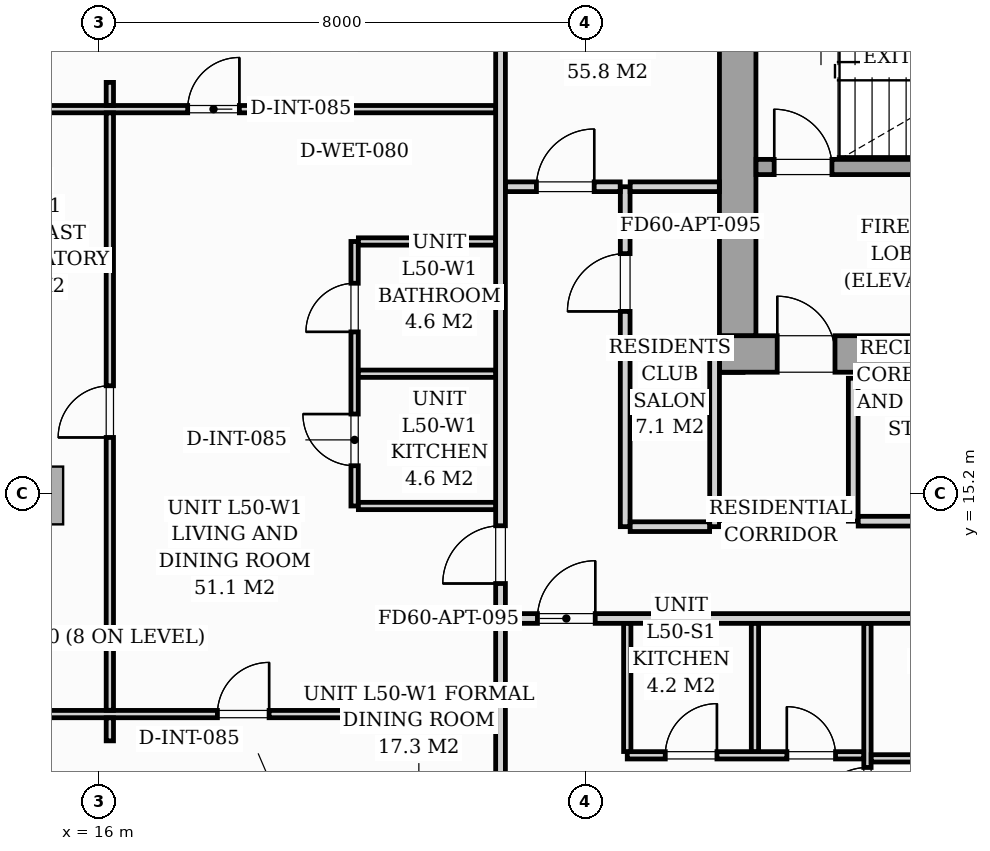
"""IFC4 building model, lengths in metres.
Left out: names, types, materials, properties, quantities, classifications, styles, units other than length and angle.
Written with IfcOpenShell. Run it as: python <this file> out.ifc"""

import sys

from ifc_helpers import new_model, si_unit, direction, frame, frame_2d, origin, origin_2d, place, context, subcontext, project, spatial, rectangle, i_section, extrude, source, transform, mapped, element, fill, save


model = new_model("IFC4")
c1 = context("Model", 3, precision=1e-05, world=origin(), true_north=direction((0.0, 1.0)))
c2 = subcontext(c1, "Body", "Model", "MODEL_VIEW")
j1 = project(units=[si_unit("LENGTHUNIT", "METRE"), si_unit("PLANEANGLEUNIT", "RADIAN")], contexts=[c1])
p1 = place(None, origin())
s1 = spatial("IfcSite", under=j1, at=p1, CompositionType="ELEMENT")
p2 = place(p1, origin())
s2 = spatial("IfcBuilding", under=s1, at=p2, CompositionType="ELEMENT")
p3 = place(p2, frame((0.0, 0.0, 176.2)))
s3 = spatial("IfcBuildingStorey", under=s2, at=p3, CompositionType="ELEMENT", Elevation=176.2)
m1 = source(origin(), c2, "Body", "SweptSolid", [
    extrude(i_section(OverallWidth=0.416, OverallDepth=0.446, WebThickness=0.039, FlangeThickness=0.063, FilletRadius=0.018, at=origin_2d()), origin(), (0.0, 0.0, 1.0), 3.196),
])
p4 = place(p3, frame((26.4, 17.4, 0.002), z_axis=(0.0, 0.0, 1.0), x_axis=(1.0, 0.0, 0.0)))
e1 = element("IfcColumn", 1, at=p4, inside=s3, PredefinedType="PILASTER", context=c2, shape_type="MappedRepresentation", body=[
    mapped(m1, transform((0.0, 0.0, 0.0), scale=1.0)),
])
m2 = source(origin(), c2, "Body", "SweptSolid", [
    extrude(rectangle(XDim=0.75, YDim=0.95, at=origin_2d()), origin(), (0.0, 0.0, 1.0), 3.196),
])
p5 = place(p3, frame((15.032, 15.173, 0.002), z_axis=(0.0, 0.0, 1.0), x_axis=(0.995396198367, 0.09584575252, 0.0)))
e2 = element("IfcColumn", 2, at=p5, inside=s3, PredefinedType="COLUMN", context=c2, shape_type="MappedRepresentation", body=[
    mapped(m2, transform((0.0, 0.0, 0.0), scale=1.0)),
])
p6 = place(p3, frame((26.2, 17.5, 0.0), z_axis=(0.0, 0.0, 1.0), x_axis=(1.0, 0.0, 0.0)))
e3 = element("IfcWall", 3, at=p6, inside=s3, PredefinedType="SHEAR", context=c2, shape_type="SweptSolid", body=[
    extrude(rectangle(XDim=19.6, YDim=0.6, at=frame_2d((9.8, 0.0))), origin(), (0.0, 0.0, 1.0), 3.2),
])
p7 = place(p6, frame((0.95, 0.0, 0.0)))
e4 = element("IfcOpeningElement", 4, at=p7, cuts=e3, PredefinedType="OPENING", context=c2, shape_type="SweptSolid", body=[
    extrude(rectangle(XDim=0.95, YDim=2.06, at=frame_2d((0.475, 1.03))), frame((0.0, 0.31, 0.0), z_axis=(0.0, -1.0, 0.0), x_axis=(1.0, 0.0, 0.0)), (0.0, 0.0, 1.0), 0.62),
])
p8 = place(p6, frame((9.38, 0.0, 0.0)))
e5 = element("IfcOpeningElement", 5, at=p8, cuts=e3, PredefinedType="OPENING", context=c2, shape_type="SweptSolid", body=[
    extrude(rectangle(XDim=0.85, YDim=2.0, at=frame_2d((0.425, 1.0))), frame((0.0, 0.31, 0.0), z_axis=(0.0, -1.0, 0.0), x_axis=(1.0, 0.0, 0.0)), (0.0, 0.0, 1.0), 0.62),
])
p9 = place(p6, frame((17.55, 0.0, 0.0)))
e6 = element("IfcOpeningElement", 6, at=p9, cuts=e3, PredefinedType="OPENING", context=c2, shape_type="SweptSolid", body=[
    extrude(rectangle(XDim=0.95, YDim=2.06, at=frame_2d((0.475, 1.03))), frame((0.0, 0.31, 0.0), z_axis=(0.0, -1.0, 0.0), x_axis=(1.0, 0.0, 0.0)), (0.0, 0.0, 1.0), 0.62),
])
p10 = place(p3, frame((26.5, 17.802, 0.0), z_axis=(0.0, 0.0, 1.0), x_axis=(0.0, 1.0, 0.0)))
e7 = element("IfcWall", 7, at=p10, inside=s3, PredefinedType="SHEAR", context=c2, shape_type="SweptSolid", body=[
    extrude(rectangle(XDim=5.796, YDim=0.6, at=frame_2d((2.898, 0.0))), origin(), (0.0, 0.0, 1.0), 3.2),
])
p11 = place(p3, frame((26.802, 20.575, 0.0), z_axis=(0.0, 0.0, 1.0), x_axis=(1.0, 0.0, 0.0)))
e8 = element("IfcWall", 8, at=p11, inside=s3, PredefinedType="SOLIDWALL", context=c2, shape_type="SweptSolid", body=[
    extrude(rectangle(XDim=8.148, YDim=0.25, at=frame_2d((4.074, 0.0))), origin(), (0.0, 0.0, 1.0), 3.2),
])
p12 = place(p11, frame((0.298, 0.0, 0.0)))
e9 = element("IfcOpeningElement", 9, at=p12, cuts=e8, PredefinedType="OPENING", context=c2, shape_type="SweptSolid", body=[
    extrude(rectangle(XDim=0.95, YDim=2.06, at=frame_2d((0.475, 1.03))), frame((0.0, 0.135, 0.0), z_axis=(0.0, -1.0, 0.0), x_axis=(1.0, 0.0, 0.0)), (0.0, 0.0, 1.0), 0.27),
])
p13 = place(p3, frame((28.4, 14.75, 0.0), z_axis=(0.0, 0.0, 1.0), x_axis=(0.0, 1.0, 0.0)))
e10 = element("IfcWall", 10, at=p13, inside=s3, PredefinedType="PARTITIONING", context=c2, shape_type="SweptSolid", body=[
    extrude(rectangle(XDim=2.35, YDim=0.16, at=frame_2d((1.175, 0.0))), origin(), (0.0, 0.0, 1.0), 2.94),
])
p14 = place(p3, frame((28.482, 14.75, 0.0), z_axis=(0.0, 0.0, 1.0), x_axis=(1.0, 0.0, 0.0)))
e11 = element("IfcWall", 11, at=p14, inside=s3, PredefinedType="PARTITIONING", context=c2, shape_type="SweptSolid", body=[
    extrude(rectangle(XDim=4.516, YDim=0.16, at=frame_2d((2.258, 0.0))), origin(), (0.0, 0.0, 1.0), 2.94),
])
p15 = place(p14, frame((1.868, 0.0, 0.0)))
e12 = element("IfcOpeningElement", 12, at=p15, cuts=e11, PredefinedType="OPENING", context=c2, shape_type="SweptSolid", body=[
    extrude(rectangle(XDim=0.8, YDim=2.05, at=frame_2d((0.4, 1.025))), frame((0.0, 0.09, 0.0), z_axis=(0.0, -1.0, 0.0), x_axis=(1.0, 0.0, 0.0)), (0.0, 0.0, 1.0), 0.18),
])
p16 = place(p3, frame((22.6, 13.15, 0.0), z_axis=(0.0, 0.0, 1.0), x_axis=(1.0, 0.0, 0.0)))
e13 = element("IfcWall", 13, at=p16, inside=s3, PredefinedType="PARTITIONING", context=c2, shape_type="SweptSolid", body=[
    extrude(rectangle(XDim=23.28, YDim=0.16, at=frame_2d((11.64, 0.0))), origin(), (0.0, 0.0, 1.0), 2.94),
])
p17 = place(p16, frame((0.607, 0.0, 0.0)))
e14 = element("IfcOpeningElement", 14, at=p17, cuts=e13, PredefinedType="OPENING", context=c2, shape_type="SweptSolid", body=[
    extrude(rectangle(XDim=0.95, YDim=2.06, at=frame_2d((0.475, 1.03))), frame((0.0, 0.09, 0.0), z_axis=(0.0, -1.0, 0.0), x_axis=(1.0, 0.0, 0.0)), (0.0, 0.0, 1.0), 0.18),
])
p18 = place(p16, frame((11.717, 0.0, 0.0)))
e15 = element("IfcOpeningElement", 15, at=p18, cuts=e13, PredefinedType="OPENING", context=c2, shape_type="SweptSolid", body=[
    extrude(rectangle(XDim=0.95, YDim=2.06, at=frame_2d((0.475, 1.03))), frame((0.0, 0.09, 0.0), z_axis=(0.0, -1.0, 0.0), x_axis=(1.0, 0.0, 0.0)), (0.0, 0.0, 1.0), 0.18),
])
p19 = place(p3, frame((22.6, 6.922, 0.0), z_axis=(0.0, 0.0, 1.0), x_axis=(0.0, 1.0, 0.0)))
e16 = element("IfcWall", 16, at=p19, inside=s3, PredefinedType="PARTITIONING", context=c2, shape_type="SweptSolid", body=[
    extrude(rectangle(XDim=6.146, YDim=0.16, at=frame_2d((3.073, 0.0))), origin(), (0.0, 0.0, 1.0), 2.94),
])
p20 = place(p3, frame((22.6, 13.232, 0.0), z_axis=(0.0, 0.0, 1.0), x_axis=(0.0, 1.0, 0.0)))
e17 = element("IfcWall", 17, at=p20, inside=s3, PredefinedType="PARTITIONING", context=c2, shape_type="SweptSolid", body=[
    extrude(rectangle(XDim=11.649, YDim=0.16, at=frame_2d((5.824, 0.0))), origin(), (0.0, 0.0, 1.0), 2.94),
])
p21 = place(p20, frame((0.493, 0.0, 0.0)))
e18 = element("IfcOpeningElement", 18, at=p21, cuts=e17, PredefinedType="OPENING", context=c2, shape_type="SweptSolid", body=[
    extrude(rectangle(XDim=0.95, YDim=2.06, at=frame_2d((0.475, 1.03))), frame((0.0, 0.09, 0.0), z_axis=(0.0, -1.0, 0.0), x_axis=(1.0, 0.0, 0.0)), (0.0, 0.0, 1.0), 0.18),
])
p22 = place(p3, frame((28.634, 7.503, 0.0), z_axis=(0.0, 0.0, 1.0), x_axis=(0.0, 1.0, 0.0)))
e19 = element("IfcWall", 19, at=p22, inside=s3, PredefinedType="PARTITIONING", context=c2, shape_type="SweptSolid", body=[
    extrude(rectangle(XDim=5.565, YDim=0.12, at=frame_2d((2.782, 0.0))), origin(), (0.0, 0.0, 1.0), 2.94),
])
p23 = place(p22, frame((2.297, 0.0, 0.0)))
e20 = element("IfcOpeningElement", 20, at=p23, cuts=e19, PredefinedType="OPENING", context=c2, shape_type="SweptSolid", body=[
    extrude(rectangle(XDim=0.9, YDim=2.05, at=frame_2d((0.45, 1.025))), frame((0.0, 0.07, 0.0), z_axis=(0.0, -1.0, 0.0), x_axis=(1.0, 0.0, 0.0)), (0.0, 0.0, 1.0), 0.14),
])
p24 = place(p3, frame((24.684, 10.9, 0.0), z_axis=(0.0, 0.0, 1.0), x_axis=(1.0, 0.0, 0.0)))
e21 = element("IfcWall", 21, at=p24, inside=s3, PredefinedType="PARTITIONING", context=c2, shape_type="SweptSolid", body=[
    extrude(rectangle(XDim=3.888, YDim=0.12, at=frame_2d((1.944, 0.0))), origin(), (0.0, 0.0, 1.0), 2.94),
])
p25 = place(p24, frame((0.625, 0.0, 0.0)))
e22 = element("IfcOpeningElement", 22, at=p25, cuts=e21, PredefinedType="OPENING", context=c2, shape_type="SweptSolid", body=[
    extrude(rectangle(XDim=0.85, YDim=2.05, at=frame_2d((0.425, 1.025))), frame((0.0, 0.07, 0.0), z_axis=(0.0, -1.0, 0.0), x_axis=(1.0, 0.0, 0.0)), (0.0, 0.0, 1.0), 0.14),
])
p26 = place(p24, frame((2.625, 0.0, 0.0)))
e23 = element("IfcOpeningElement", 23, at=p26, cuts=e21, PredefinedType="OPENING", context=c2, shape_type="SweptSolid", body=[
    extrude(rectangle(XDim=0.8, YDim=2.02, at=frame_2d((0.4, 1.01))), frame((0.0, 0.07, 0.0), z_axis=(0.0, -1.0, 0.0), x_axis=(1.0, 0.0, 0.0)), (0.0, 0.0, 1.0), 0.14),
])
for number, where, z_axis, x_axis in (
    (24, (26.784, 10.962, 0.0), (0.0, 0.0, 1.0), (0.0, 1.0, 0.0)),
    (25, (24.684, 10.962, 0.0), (0.0, 0.0, 1.0), (0.0, 1.0, 0.0)),
):
    element("IfcWall", number, at=place(p3, frame(where, z_axis=z_axis, x_axis=x_axis)), inside=s3, PredefinedType="PARTITIONING", context=c2, shape_type="SweptSolid", body=[
        extrude(rectangle(XDim=2.106, YDim=0.12, at=frame_2d((1.053, 0.0))), origin(), (0.0, 0.0, 1.0), 2.94),
    ])
p27 = place(p3, frame((28.696, 10.85, 0.0), z_axis=(0.0, 0.0, 1.0), x_axis=(1.0, 0.0, 0.0)))
e26 = element("IfcWall", 26, at=p27, inside=s3, PredefinedType="PARTITIONING", context=c2, shape_type="SweptSolid", body=[
    extrude(rectangle(XDim=2.688, YDim=0.12, at=frame_2d((1.344, 0.0))), origin(), (0.0, 0.0, 1.0), 2.94),
])
p28 = place(p27, frame((0.863, 0.0, 0.0)))
e27 = element("IfcOpeningElement", 27, at=p28, cuts=e26, PredefinedType="OPENING", context=c2, shape_type="SweptSolid", body=[
    extrude(rectangle(XDim=0.8, YDim=2.02, at=frame_2d((0.4, 1.01))), frame((0.0, 0.07, 0.0), z_axis=(0.0, -1.0, 0.0), x_axis=(1.0, 0.0, 0.0)), (0.0, 0.0, 1.0), 0.14),
])
p29 = place(p3, frame((20.2, 15.0, 0.0), z_axis=(0.0, 0.0, 1.0), x_axis=(0.0, 1.0, 0.0)))
e28 = element("IfcWall", 28, at=p29, inside=s3, PredefinedType="PARTITIONING", context=c2, shape_type="SweptSolid", body=[
    extrude(rectangle(XDim=4.35, YDim=0.12, at=frame_2d((2.175, 0.0))), origin(), (0.0, 0.0, 1.0), 2.94),
])
p30 = place(p29, frame((0.662, 0.0, 0.0)))
e29 = element("IfcOpeningElement", 29, at=p30, cuts=e28, PredefinedType="OPENING", context=c2, shape_type="SweptSolid", body=[
    extrude(rectangle(XDim=0.85, YDim=2.05, at=frame_2d((0.425, 1.025))), frame((0.0, 0.07, 0.0), z_axis=(0.0, -1.0, 0.0), x_axis=(1.0, 0.0, 0.0)), (0.0, 0.0, 1.0), 0.14),
])
p31 = place(p29, frame((2.863, 0.0, 0.0)))
e30 = element("IfcOpeningElement", 30, at=p31, cuts=e28, PredefinedType="OPENING", context=c2, shape_type="SweptSolid", body=[
    extrude(rectangle(XDim=0.8, YDim=2.02, at=frame_2d((0.4, 1.01))), frame((0.0, 0.07, 0.0), z_axis=(0.0, -1.0, 0.0), x_axis=(1.0, 0.0, 0.0)), (0.0, 0.0, 1.0), 0.14),
])
for number, where, z_axis, x_axis in (
    (31, (20.262, 17.175, 0.0), (0.0, 0.0, 1.0), (1.0, 0.0, 0.0)),
    (32, (20.262, 15.0, 0.0), (0.0, 0.0, 1.0), (1.0, 0.0, 0.0)),
    (33, (20.262, 19.35, 0.0), (0.0, 0.0, 1.0), (1.0, 0.0, 0.0)),
):
    element("IfcWall", number, at=place(p3, frame(where, z_axis=z_axis, x_axis=x_axis)), inside=s3, PredefinedType="PARTITIONING", context=c2, shape_type="SweptSolid", body=[
        extrude(rectangle(XDim=2.256, YDim=0.12, at=frame_2d((1.128, 0.0))), origin(), (0.0, 0.0, 1.0), 2.94),
    ])
p32 = place(p3, frame((14.53, 21.526, 0.0), z_axis=(0.0, 0.0, 1.0), x_axis=(1.0, 0.0, 0.0)))
e34 = element("IfcWall", 34, at=p32, inside=s3, PredefinedType="PARTITIONING", context=c2, shape_type="SweptSolid", body=[
    extrude(rectangle(XDim=7.988, YDim=0.12, at=frame_2d((3.994, 0.0))), origin(), (0.0, 0.0, 1.0), 2.94),
])
p33 = place(p32, frame((2.925, 0.0, 0.0)))
e35 = element("IfcOpeningElement", 35, at=p33, cuts=e34, PredefinedType="OPENING", context=c2, shape_type="SweptSolid", body=[
    extrude(rectangle(XDim=0.85, YDim=2.05, at=frame_2d((0.425, 1.025))), frame((0.0, 0.07, 0.0), z_axis=(0.0, -1.0, 0.0), x_axis=(1.0, 0.0, 0.0)), (0.0, 0.0, 1.0), 0.14),
])
p34 = place(p3, frame((14.233, 11.578, 0.0), z_axis=(0.0, 0.0, 1.0), x_axis=(1.0, 0.0, 0.0)))
e36 = element("IfcWall", 36, at=p34, inside=s3, PredefinedType="PARTITIONING", context=c2, shape_type="SweptSolid", body=[
    extrude(rectangle(XDim=8.285, YDim=0.12, at=frame_2d((4.143, 0.0))), origin(), (0.0, 0.0, 1.0), 2.94),
])
p35 = place(p34, frame((3.711, 0.0, 0.0)))
e37 = element("IfcOpeningElement", 37, at=p35, cuts=e36, PredefinedType="OPENING", context=c2, shape_type="SweptSolid", body=[
    extrude(rectangle(XDim=0.85, YDim=2.05, at=frame_2d((0.425, 1.025))), frame((0.0, 0.07, 0.0), z_axis=(0.0, -1.0, 0.0), x_axis=(1.0, 0.0, 0.0)), (0.0, 0.0, 1.0), 0.14),
])
p36 = place(p3, frame((16.175, 11.138, 0.0), z_axis=(0.0, 0.0, 1.0), x_axis=(0.0, 1.0, 0.0)))
e38 = element("IfcWall", 38, at=p36, inside=s3, PredefinedType="PARTITIONING", context=c2, shape_type="SweptSolid", body=[
    extrude(rectangle(XDim=0.378, YDim=0.12, at=frame_2d((0.189, 0.0))), origin(), (0.0, 0.0, 1.0), 2.94),
])
p37 = place(p3, frame((16.175, 11.64, 0.0), z_axis=(0.0, 0.0, 1.0), x_axis=(0.0, 1.0, 0.0)))
e39 = element("IfcWall", 39, at=p37, inside=s3, PredefinedType="PARTITIONING", context=c2, shape_type="SweptSolid", body=[
    extrude(rectangle(XDim=9.824, YDim=0.12, at=frame_2d((4.912, 0.0))), origin(), (0.0, 0.0, 1.0), 2.383),
])
p38 = place(p37, frame((4.487, 0.0, 0.0)))
e40 = element("IfcOpeningElement", 40, at=p38, cuts=e39, PredefinedType="OPENING", context=c2, shape_type="SweptSolid", body=[
    extrude(rectangle(XDim=0.85, YDim=2.05, at=frame_2d((0.425, 1.025))), frame((0.0, 0.07, 0.0), z_axis=(0.0, -1.0, 0.0), x_axis=(1.0, 0.0, 0.0)), (0.0, 0.0, 1.0), 0.14),
])
p39 = place(p3, frame((16.175, 21.588, 0.0), z_axis=(0.0, 0.0, 1.0), x_axis=(0.0, 1.0, 0.0)))
e41 = element("IfcWall", 41, at=p39, inside=s3, PredefinedType="PARTITIONING", context=c2, shape_type="SweptSolid", body=[
    extrude(rectangle(XDim=0.378, YDim=0.12, at=frame_2d((0.189, 0.0))), origin(), (0.0, 0.0, 1.0), 2.94),
])
p40 = place(p3, frame((24.65, 14.66, 0.0), z_axis=(0.0, 0.0, 1.0), x_axis=(0.0, 1.0, 0.0)))
e42 = element("IfcWall", 42, at=p40, inside=s3, PredefinedType="PARTITIONING", context=c2, shape_type="SweptSolid", body=[
    extrude(rectangle(XDim=5.59, YDim=0.16, at=frame_2d((2.795, 0.0))), origin(), (0.0, 0.0, 1.0), 2.94),
])
p41 = place(p40, frame((3.54, 0.0, 0.0)))
e43 = element("IfcOpeningElement", 43, at=p41, cuts=e42, PredefinedType="OPENING", context=c2, shape_type="SweptSolid", body=[
    extrude(rectangle(XDim=0.95, YDim=2.06, at=frame_2d((0.475, 1.03))), frame((0.0, 0.09, 0.0), z_axis=(0.0, -1.0, 0.0), x_axis=(1.0, 0.0, 0.0)), (0.0, 0.0, 1.0), 0.18),
])
p42 = place(p3, frame((22.682, 20.25, 0.0), z_axis=(0.0, 0.0, 1.0), x_axis=(1.0, 0.0, 0.0)))
e44 = element("IfcWall", 44, at=p42, inside=s3, PredefinedType="PARTITIONING", context=c2, shape_type="SweptSolid", body=[
    extrude(rectangle(XDim=1.886, YDim=0.16, at=frame_2d((0.943, 0.0))), origin(), (0.0, 0.0, 1.0), 2.94),
])
p43 = place(p42, frame((0.508, 0.0, 0.0)))
e45 = element("IfcOpeningElement", 45, at=p43, cuts=e44, PredefinedType="OPENING", context=c2, shape_type="SweptSolid", body=[
    extrude(rectangle(XDim=0.95, YDim=2.06, at=frame_2d((0.475, 1.03))), frame((0.0, 0.09, 0.0), z_axis=(0.0, -1.0, 0.0), x_axis=(1.0, 0.0, 0.0)), (0.0, 0.0, 1.0), 0.18),
])
p44 = place(p3, frame((24.732, 20.25, 0.0), z_axis=(0.0, 0.0, 1.0), x_axis=(1.0, 0.0, 0.0)))
e46 = element("IfcWall", 46, at=p44, inside=s3, PredefinedType="PARTITIONING", context=c2, shape_type="SweptSolid", body=[
    extrude(rectangle(XDim=1.466, YDim=0.16, at=frame_2d((0.733, 0.0))), origin(), (0.0, 0.0, 1.0), 2.94),
])
p45 = place(p3, frame((26.12, 14.66, 0.0), z_axis=(0.0, 0.0, 1.0), x_axis=(0.0, 1.0, 0.0)))
e47 = element("IfcWall", 47, at=p45, inside=s3, PredefinedType="PARTITIONING", context=c2, shape_type="SweptSolid", body=[
    extrude(rectangle(XDim=2.79, YDim=0.16, at=frame_2d((1.395, 0.0))), origin(), (0.0, 0.0, 1.0), 2.94),
])
p46 = place(p3, frame((24.732, 14.66, 0.0), z_axis=(0.0, 0.0, 1.0), x_axis=(1.0, 0.0, 0.0)))
e48 = element("IfcWall", 48, at=p46, inside=s3, PredefinedType="PARTITIONING", context=c2, shape_type="SweptSolid", body=[
    extrude(rectangle(XDim=1.306, YDim=0.16, at=frame_2d((0.653, 0.0))), origin(), (0.0, 0.0, 1.0), 2.94),
])
m3 = source(origin(), c2, "Body", "SweptSolid", [
    extrude(rectangle(XDim=0.95, YDim=2.06, at=frame_2d((0.475, 1.03))), frame((0.0, 0.025, 0.0), z_axis=(0.0, -1.0, 0.0), x_axis=(1.0, 0.0, 0.0)), (0.0, 0.0, 1.0), 0.05),
])
p47 = place(p7, origin())
e49 = element("IfcDoor", 49, at=p47, inside=s3, OperationType="SINGLE_SWING_LEFT", PredefinedType="DOOR", context=c2, shape_type="MappedRepresentation", body=[
    mapped(m3, transform((0.0, 0.0, 0.0), scale=1.0)),
])
fill(e4, e49)
p48 = place(p12, origin())
e50 = element("IfcDoor", 50, at=p48, inside=s3, OperationType="SINGLE_SWING_LEFT", PredefinedType="DOOR", context=c2, shape_type="MappedRepresentation", body=[
    mapped(m3, transform((0.0, 0.0, 0.0), scale=1.0)),
])
fill(e9, e50)
m4 = source(origin(), c2, "Body", "SweptSolid", [
    extrude(rectangle(XDim=0.95, YDim=2.06, at=frame_2d((0.475, 1.03))), frame((0.0, 0.025, 0.0), z_axis=(0.0, -1.0, 0.0), x_axis=(1.0, 0.0, 0.0)), (0.0, 0.0, 1.0), 0.05),
])
p49 = place(p17, origin())
e51 = element("IfcDoor", 51, at=p49, inside=s3, OperationType="SINGLE_SWING_RIGHT", PredefinedType="DOOR", context=c2, shape_type="MappedRepresentation", body=[
    mapped(m4, transform((0.0, 0.0, 0.0), scale=1.0)),
])
fill(e14, e51)
m5 = source(origin(), c2, "Body", "SweptSolid", [
    extrude(rectangle(XDim=0.9, YDim=2.05, at=frame_2d((0.45, 1.025))), frame((0.0, 0.025, 0.0), z_axis=(0.0, -1.0, 0.0), x_axis=(1.0, 0.0, 0.0)), (0.0, 0.0, 1.0), 0.05),
])
p50 = place(p23, origin())
e52 = element("IfcDoor", 52, at=p50, inside=s3, OperationType="SINGLE_SWING_LEFT", PredefinedType="DOOR", context=c2, shape_type="MappedRepresentation", body=[
    mapped(m5, transform((0.0, 0.0, 0.0), scale=1.0)),
])
fill(e20, e52)
m6 = source(origin(), c2, "Body", "SweptSolid", [
    extrude(rectangle(XDim=0.85, YDim=2.05, at=frame_2d((0.425, 1.025))), frame((0.0, 0.025, 0.0), z_axis=(0.0, -1.0, 0.0), x_axis=(1.0, 0.0, 0.0)), (0.0, 0.0, 1.0), 0.05),
])
p51 = place(p25, origin())
e53 = element("IfcDoor", 53, at=p51, inside=s3, OperationType="SINGLE_SWING_RIGHT", PredefinedType="DOOR", context=c2, shape_type="MappedRepresentation", body=[
    mapped(m6, transform((0.0, 0.0, 0.0), scale=1.0)),
])
fill(e22, e53)
m7 = source(origin(), c2, "Body", "SweptSolid", [
    extrude(rectangle(XDim=0.8, YDim=2.02, at=frame_2d((0.4, 1.01))), frame((0.0, 0.025, 0.0), z_axis=(0.0, -1.0, 0.0), x_axis=(1.0, 0.0, 0.0)), (0.0, 0.0, 1.0), 0.05),
])
p52 = place(p26, origin())
e54 = element("IfcDoor", 54, at=p52, inside=s3, OperationType="SINGLE_SWING_LEFT", PredefinedType="DOOR", context=c2, shape_type="MappedRepresentation", body=[
    mapped(m7, transform((0.0, 0.0, 0.0), scale=1.0)),
])
fill(e23, e54)
p53 = place(p21, origin())
e55 = element("IfcDoor", 55, at=p53, inside=s3, OperationType="SINGLE_SWING_LEFT", PredefinedType="DOOR", context=c2, shape_type="MappedRepresentation", body=[
    mapped(m4, transform((0.0, 0.0, 0.0), scale=1.0)),
])
fill(e18, e55)
p54 = place(p30, origin())
e56 = element("IfcDoor", 56, at=p54, inside=s3, OperationType="SINGLE_SWING_RIGHT", PredefinedType="DOOR", context=c2, shape_type="MappedRepresentation", body=[
    mapped(m6, transform((0.0, 0.0, 0.0), scale=1.0)),
])
fill(e29, e56)
p55 = place(p31, origin())
e57 = element("IfcDoor", 57, at=p55, inside=s3, OperationType="SINGLE_SWING_LEFT", PredefinedType="DOOR", context=c2, shape_type="MappedRepresentation", body=[
    mapped(m7, transform((0.0, 0.0, 0.0), scale=1.0)),
])
fill(e30, e57)
p56 = place(p33, origin())
e58 = element("IfcDoor", 58, at=p56, inside=s3, OperationType="SINGLE_SWING_RIGHT", PredefinedType="DOOR", context=c2, shape_type="MappedRepresentation", body=[
    mapped(m6, transform((0.0, 0.0, 0.0), scale=1.0)),
])
fill(e35, e58)
p57 = place(p35, origin())
e59 = element("IfcDoor", 59, at=p57, inside=s3, OperationType="SINGLE_SWING_RIGHT", PredefinedType="DOOR", context=c2, shape_type="MappedRepresentation", body=[
    mapped(m6, transform((0.0, 0.0, 0.0), scale=1.0)),
])
fill(e37, e59)
p58 = place(p38, origin())
e60 = element("IfcDoor", 60, at=p58, inside=s3, OperationType="SINGLE_SWING_LEFT", PredefinedType="DOOR", context=c2, shape_type="MappedRepresentation", body=[
    mapped(m6, transform((0.0, 0.0, 0.0), scale=1.0)),
])
fill(e40, e60)
p59 = place(p41, origin())
e61 = element("IfcDoor", 61, at=p59, inside=s3, OperationType="SINGLE_SWING_LEFT", PredefinedType="DOOR", context=c2, shape_type="MappedRepresentation", body=[
    mapped(m4, transform((0.0, 0.0, 0.0), scale=1.0)),
])
fill(e43, e61)
p60 = place(p43, origin())
e62 = element("IfcDoor", 62, at=p60, inside=s3, OperationType="SINGLE_SWING_RIGHT", PredefinedType="DOOR", context=c2, shape_type="MappedRepresentation", body=[
    mapped(m4, transform((0.0, 0.0, 0.0), scale=1.0)),
])
fill(e45, e62)
save(model, sys.argv[1])
